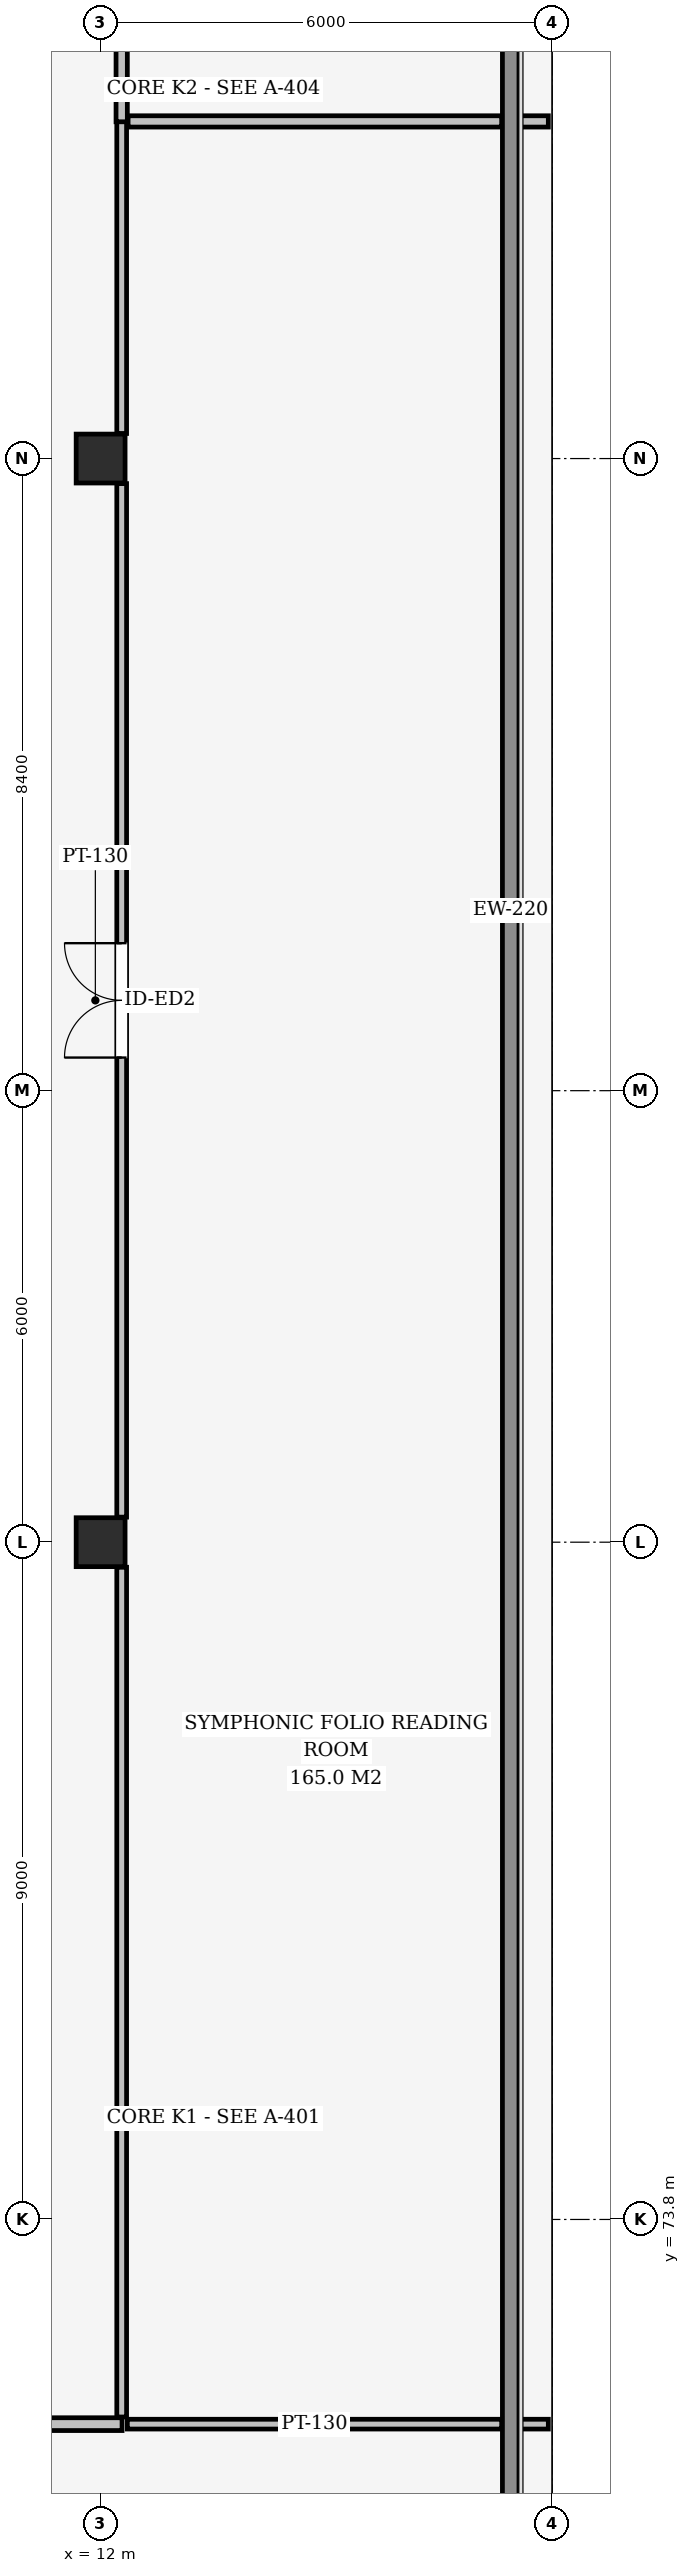
"""IFC4 building model, lengths in metres.
Left out: names, types, materials, properties, quantities, classifications, styles, units other than length and angle.
Written with IfcOpenShell. Run it as: python <this file> out.ifc"""

import sys

from ifc_helpers import new_model, si_unit, direction, frame, frame_2d, origin, origin_2d, place, context, subcontext, project, spatial, rectangle, extrude, element, fill, save


model = new_model("IFC4")
c1 = context("Model", 3, precision=1e-05, world=origin(), true_north=direction((0.0, 1.0)))
c2 = subcontext(c1, "Body", "Model", "MODEL_VIEW")
j1 = project(units=[si_unit("LENGTHUNIT", "METRE"), si_unit("PLANEANGLEUNIT", "RADIAN")], contexts=[c1])
p1 = place(None, origin())
s1 = spatial("IfcSite", under=j1, at=p1, CompositionType="ELEMENT")
p2 = place(p1, origin())
s2 = spatial("IfcBuilding", under=s1, at=p2, CompositionType="ELEMENT")
p3 = place(p2, frame((0.0, 0.0, 22.2)))
s3 = spatial("IfcBuildingStorey", under=s2, at=p3, CompositionType="ELEMENT", Elevation=22.2)
for number, where, z_axis, x_axis in (
    (1, (12.0, 82.8, 0.0), (0.0, 0.0, 1.0), (1.0, 0.0, 0.0)),
    (2, (12.0, 97.2, 0.0), (0.0, 0.0, 1.0), (1.0, 0.0, 0.0)),
):
    element("IfcColumn", number, at=place(p3, frame(where, z_axis=z_axis, x_axis=x_axis)), inside=s3, PredefinedType="COLUMN", context=c2, shape_type="SweptSolid", body=[
        extrude(rectangle(XDim=0.65, YDim=0.65, at=origin_2d()), origin(), (0.0, 0.0, 1.0), 4.5),
    ])
p4 = place(p3, frame((17.45, 113.76, 0.0), z_axis=(0.0, 0.0, 1.0), x_axis=(0.0, -1.0, 0.0)))
e3 = element("IfcWall", 3, at=p4, inside=s3, PredefinedType="SOLIDWALL", context=c2, shape_type="SweptSolid", body=[
    extrude(rectangle(XDim=45.12, YDim=0.22, at=frame_2d((22.56, 0.0))), origin(), (0.0, 0.0, 1.0), 3.15),
])
p5 = place(p3, frame((0.18, 71.08, 0.0), z_axis=(0.0, 0.0, 1.0), x_axis=(1.0, 0.0, 0.0)))
e4 = element("IfcWall", 4, at=p5, inside=s3, PredefinedType="PARTITIONING", context=c2, shape_type="SweptSolid", body=[
    extrude(rectangle(XDim=12.105, YDim=0.17, at=frame_2d((6.052, 0.0))), origin(), (0.0, 0.0, 1.0), 4.5),
])
p6 = place(p5, frame((6.978, 0.0, 0.0)))
e5 = element("IfcOpeningElement", 5, at=p6, cuts=e4, PredefinedType="OPENING", context=c2, shape_type="SweptSolid", body=[
    extrude(rectangle(XDim=1.36, YDim=2.2, at=frame_2d((0.68, 1.1))), frame((0.0, 0.095, 0.0), z_axis=(0.0, -1.0, 0.0), x_axis=(1.0, 0.0, 0.0)), (0.0, 0.0, 1.0), 0.19),
])
p7 = place(p3, frame((12.28, 71.175, 0.0), z_axis=(0.0, 0.0, 1.0), x_axis=(0.0, 1.0, 0.0)))
e6 = element("IfcWall", 6, at=p7, inside=s3, PredefinedType="PARTITIONING", context=c2, shape_type="SweptSolid", body=[
    extrude(rectangle(XDim=11.292, YDim=0.13, at=frame_2d((5.646, 0.0))), origin(), (0.0, 0.0, 1.0), 4.5),
])
p8 = place(p3, frame((12.28, 83.133, 0.0), z_axis=(0.0, 0.0, 1.0), x_axis=(0.0, 1.0, 0.0)))
e7 = element("IfcWall", 7, at=p8, inside=s3, PredefinedType="PARTITIONING", context=c2, shape_type="SweptSolid", body=[
    extrude(rectangle(XDim=13.734, YDim=0.13, at=frame_2d((6.867, 0.0))), origin(), (0.0, 0.0, 1.0), 4.5),
])
p9 = place(p8, frame((6.107, 0.0, 0.0)))
e8 = element("IfcOpeningElement", 8, at=p9, cuts=e7, PredefinedType="OPENING", context=c2, shape_type="SweptSolid", body=[
    extrude(rectangle(XDim=1.52, YDim=2.24, at=frame_2d((0.76, 1.12))), frame((0.0, 0.075, 0.0), z_axis=(0.0, -1.0, 0.0), x_axis=(1.0, 0.0, 0.0)), (0.0, 0.0, 1.0), 0.15),
])
p10 = place(p3, frame((12.28, 97.533, 0.0), z_axis=(0.0, 0.0, 1.0), x_axis=(0.0, 1.0, 0.0)))
e9 = element("IfcWall", 9, at=p10, inside=s3, PredefinedType="PARTITIONING", context=c2, shape_type="SweptSolid", body=[
    extrude(rectangle(XDim=4.152, YDim=0.13, at=frame_2d((2.076, 0.0))), origin(), (0.0, 0.0, 1.0), 4.5),
])
p11 = place(p3, frame((12.28, 101.675, 0.0), z_axis=(0.0, 0.0, 1.0), x_axis=(0.0, 1.0, 0.0)))
e10 = element("IfcWall", 10, at=p11, inside=s3, PredefinedType="PARTITIONING", context=c2, shape_type="SweptSolid", body=[
    extrude(rectangle(XDim=4.61, YDim=0.15, at=frame_2d((2.305, 0.0))), origin(), (0.0, 0.0, 1.0), 4.5),
])
p12 = place(p11, frame((1.835, 0.0, 0.0)))
e11 = element("IfcOpeningElement", 11, at=p12, cuts=e10, PredefinedType="OPENING", context=c2, shape_type="SweptSolid", body=[
    extrude(rectangle(XDim=0.94, YDim=2.1, at=frame_2d((0.47, 1.05))), frame((0.0, 0.085, 0.0), z_axis=(0.0, -1.0, 0.0), x_axis=(1.0, 0.0, 0.0)), (0.0, 0.0, 1.0), 0.17),
])
p13 = place(p3, frame((12.355, 71.08, 0.0), z_axis=(0.0, 0.0, 1.0), x_axis=(1.0, 0.0, 0.0)))
e12 = element("IfcWall", 12, at=p13, inside=s3, PredefinedType="PARTITIONING", context=c2, shape_type="SweptSolid", body=[
    extrude(rectangle(XDim=4.975, YDim=0.13, at=frame_2d((2.488, 0.0))), origin(), (0.0, 0.0, 1.0), 4.5),
])
p14 = place(p3, frame((17.57, 71.08, 0.0), z_axis=(0.0, 0.0, 1.0), x_axis=(1.0, 0.0, 0.0)))
e13 = element("IfcWall", 13, at=p14, inside=s3, PredefinedType="PARTITIONING", context=c2, shape_type="SweptSolid", body=[
    extrude(rectangle(XDim=0.38, YDim=0.13, at=frame_2d((0.19, 0.0))), origin(), (0.0, 0.0, 1.0), 4.5),
])
p15 = place(p3, frame((12.365, 101.68, 0.0), z_axis=(0.0, 0.0, 1.0), x_axis=(1.0, 0.0, 0.0)))
e14 = element("IfcWall", 14, at=p15, inside=s3, PredefinedType="PARTITIONING", context=c2, shape_type="SweptSolid", body=[
    extrude(rectangle(XDim=4.965, YDim=0.15, at=frame_2d((2.482, 0.0))), origin(), (0.0, 0.0, 1.0), 4.5),
])
p16 = place(p3, frame((17.57, 101.68, 0.0), z_axis=(0.0, 0.0, 1.0), x_axis=(1.0, 0.0, 0.0)))
e15 = element("IfcWall", 15, at=p16, inside=s3, PredefinedType="PARTITIONING", context=c2, shape_type="SweptSolid", body=[
    extrude(rectangle(XDim=0.38, YDim=0.15, at=frame_2d((0.19, 0.0))), origin(), (0.0, 0.0, 1.0), 4.5),
])
p17 = place(p9, origin())
e16 = element("IfcDoor", 16, at=p17, inside=s3, OperationType="DOUBLE_DOOR_SINGLE_SWING", PredefinedType="DOOR", context=c2, shape_type="SweptSolid", body=[
    extrude(rectangle(XDim=1.52, YDim=2.24, at=frame_2d((0.76, 1.12))), frame((0.0, 0.025, 0.0), z_axis=(0.0, -1.0, 0.0), x_axis=(1.0, 0.0, 0.0)), (0.0, 0.0, 1.0), 0.05),
])
fill(e8, e16)
save(model, sys.argv[1])
